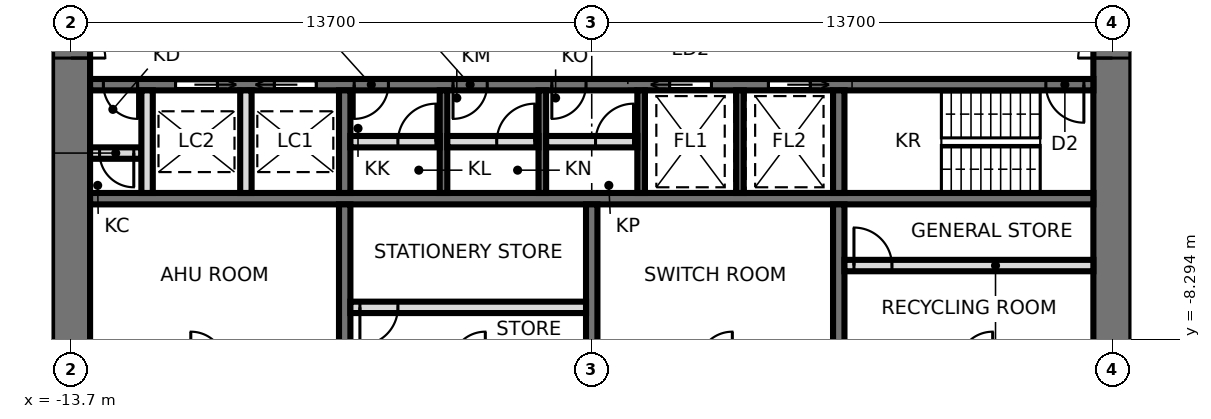
"""IFC4 building model, lengths in metres.
Left out: names, types, materials, properties, quantities, classifications, styles, units other than length and angle.
Written with IfcOpenShell. Run it as: python <this file> out.ifc"""

import sys

from ifc_helpers import new_model, si_unit, direction, frame, frame_2d, origin, place, context, subcontext, project, spatial, rectangle, extrude, element, fill, save


model = new_model("IFC4")
c1 = context("Model", 3, precision=1e-05, world=origin(), true_north=direction((0.0, 1.0)))
c2 = subcontext(c1, "Body", "Model", "MODEL_VIEW")
j1 = project(units=[si_unit("LENGTHUNIT", "METRE"), si_unit("PLANEANGLEUNIT", "RADIAN")], contexts=[c1])
p1 = place(None, origin())
s1 = spatial("IfcSite", under=j1, at=p1, CompositionType="ELEMENT")
p2 = place(p1, origin())
s2 = spatial("IfcBuilding", under=s1, at=p2, CompositionType="ELEMENT")
p3 = place(p2, frame((0.0, 0.0, 242.3)))
s3 = spatial("IfcBuildingStorey", under=s2, at=p3, CompositionType="ELEMENT", Elevation=242.3)
p4 = place(p3, frame((13.7, -9.5, 0.0), z_axis=(0.0, 0.0, 1.0), x_axis=(0.0, 1.0, 0.0)))
e1 = element("IfcWall", 1, at=p4, inside=s3, PredefinedType="SHEAR", context=c2, shape_type="SweptSolid", body=[
    extrude(rectangle(XDim=19.0, YDim=1.0, at=frame_2d((9.5, 0.0))), origin(), (0.0, 0.0, 1.0), 3.9),
])
p5 = place(p4, frame((8.6, 0.0, 0.0)))
e2 = element("IfcOpeningElement", 2, at=p5, cuts=e1, PredefinedType="OPENING", context=c2, shape_type="SweptSolid", body=[
    extrude(rectangle(XDim=1.8, YDim=2.4, at=frame_2d((0.9, 1.2))), frame((0.0, 0.51, 0.0), z_axis=(0.0, -1.0, 0.0), x_axis=(1.0, 0.0, 0.0)), (0.0, 0.0, 1.0), 1.02),
])
p6 = place(p3, frame((-13.7, 9.5, 0.0), z_axis=(0.0, 0.0, 1.0), x_axis=(0.0, -1.0, 0.0)))
e3 = element("IfcWall", 3, at=p6, inside=s3, PredefinedType="SHEAR", context=c2, shape_type="SweptSolid", body=[
    extrude(rectangle(XDim=19.0, YDim=1.0, at=frame_2d((9.5, 0.0))), origin(), (0.0, 0.0, 1.0), 3.9),
])
p7 = place(p6, frame((8.6, 0.0, 0.0)))
e4 = element("IfcOpeningElement", 4, at=p7, cuts=e3, PredefinedType="OPENING", context=c2, shape_type="SweptSolid", body=[
    extrude(rectangle(XDim=1.8, YDim=2.4, at=frame_2d((0.9, 1.2))), frame((0.0, 0.51, 0.0), z_axis=(0.0, -1.0, 0.0), x_axis=(1.0, 0.0, 0.0)), (0.0, 0.0, 1.0), 1.02),
])
p8 = place(p3, frame((-13.2, -1.6, 0.0), z_axis=(0.0, 0.0, 1.0), x_axis=(1.0, 0.0, 0.0)))
e5 = element("IfcWall", 5, at=p8, inside=s3, PredefinedType="SHEAR", context=c2, shape_type="SweptSolid", body=[
    extrude(rectangle(XDim=26.4, YDim=0.3, at=frame_2d((13.2, 0.0))), origin(), (0.0, 0.0, 1.0), 3.9),
])
p9 = place(p8, frame((25.15, 0.0, 0.0)))
e6 = element("IfcOpeningElement", 6, at=p9, cuts=e5, PredefinedType="OPENING", context=c2, shape_type="SweptSolid", body=[
    extrude(rectangle(XDim=1.0, YDim=2.1, at=frame_2d((0.5, 1.05))), frame((0.0, 0.16, 0.0), z_axis=(0.0, -1.0, 0.0), x_axis=(1.0, 0.0, 0.0)), (0.0, 0.0, 1.0), 0.32),
])
p10 = place(p8, frame((6.95, 0.0, 0.0)))
e7 = element("IfcOpeningElement", 7, at=p10, cuts=e5, PredefinedType="OPENING", context=c2, shape_type="SweptSolid", body=[
    extrude(rectangle(XDim=0.9, YDim=2.1, at=frame_2d((0.45, 1.05))), frame((0.0, 0.16, 0.0), z_axis=(0.0, -1.0, 0.0), x_axis=(1.0, 0.0, 0.0)), (0.0, 0.0, 1.0), 0.32),
])
p11 = place(p8, frame((9.55, 0.0, 0.0)))
e8 = element("IfcOpeningElement", 8, at=p11, cuts=e5, PredefinedType="OPENING", context=c2, shape_type="SweptSolid", body=[
    extrude(rectangle(XDim=0.9, YDim=2.1, at=frame_2d((0.45, 1.05))), frame((0.0, 0.16, 0.0), z_axis=(0.0, -1.0, 0.0), x_axis=(1.0, 0.0, 0.0)), (0.0, 0.0, 1.0), 0.32),
])
p12 = place(p8, frame((12.15, 0.0, 0.0)))
e9 = element("IfcOpeningElement", 9, at=p12, cuts=e5, PredefinedType="OPENING", context=c2, shape_type="SweptSolid", body=[
    extrude(rectangle(XDim=0.9, YDim=2.1, at=frame_2d((0.45, 1.05))), frame((0.0, 0.16, 0.0), z_axis=(0.0, -1.0, 0.0), x_axis=(1.0, 0.0, 0.0)), (0.0, 0.0, 1.0), 0.32),
])
p13 = place(p8, frame((15.25, 0.0, 0.0)))
e10 = element("IfcOpeningElement", 10, at=p13, cuts=e5, PredefinedType="OPENING", context=c2, shape_type="SweptSolid", body=[
    extrude(rectangle(XDim=1.1, YDim=2.3, at=frame_2d((0.55, 1.15))), frame((0.0, 0.16, 0.0), z_axis=(0.0, -1.0, 0.0), x_axis=(1.0, 0.0, 0.0)), (0.0, 0.0, 1.0), 0.32),
])
p14 = place(p8, frame((17.85, 0.0, 0.0)))
e11 = element("IfcOpeningElement", 11, at=p14, cuts=e5, PredefinedType="OPENING", context=c2, shape_type="SweptSolid", body=[
    extrude(rectangle(XDim=1.1, YDim=2.3, at=frame_2d((0.55, 1.15))), frame((0.0, 0.16, 0.0), z_axis=(0.0, -1.0, 0.0), x_axis=(1.0, 0.0, 0.0)), (0.0, 0.0, 1.0), 0.32),
])
p15 = place(p8, frame((4.85, 0.0, 0.0)))
e12 = element("IfcOpeningElement", 12, at=p15, cuts=e5, PredefinedType="OPENING", context=c2, shape_type="SweptSolid", body=[
    extrude(rectangle(XDim=1.1, YDim=2.3, at=frame_2d((0.55, 1.15))), frame((0.0, 0.16, 0.0), z_axis=(0.0, -1.0, 0.0), x_axis=(1.0, 0.0, 0.0)), (0.0, 0.0, 1.0), 0.32),
])
p16 = place(p8, frame((2.25, 0.0, 0.0)))
e13 = element("IfcOpeningElement", 13, at=p16, cuts=e5, PredefinedType="OPENING", context=c2, shape_type="SweptSolid", body=[
    extrude(rectangle(XDim=1.1, YDim=2.3, at=frame_2d((0.55, 1.15))), frame((0.0, 0.16, 0.0), z_axis=(0.0, -1.0, 0.0), x_axis=(1.0, 0.0, 0.0)), (0.0, 0.0, 1.0), 0.32),
])
p17 = place(p8, frame((0.35, 0.0, 0.0)))
e14 = element("IfcOpeningElement", 14, at=p17, cuts=e5, PredefinedType="OPENING", context=c2, shape_type="SweptSolid", body=[
    extrude(rectangle(XDim=0.9, YDim=2.1, at=frame_2d((0.45, 1.05))), frame((0.0, 0.16, 0.0), z_axis=(0.0, -1.0, 0.0), x_axis=(1.0, 0.0, 0.0)), (0.0, 0.0, 1.0), 0.32),
])
p18 = place(p3, frame((-13.2, -4.6, 0.0), z_axis=(0.0, 0.0, 1.0), x_axis=(1.0, 0.0, 0.0)))
e15 = element("IfcWall", 15, at=p18, inside=s3, PredefinedType="SHEAR", context=c2, shape_type="SweptSolid", body=[
    extrude(rectangle(XDim=26.4, YDim=0.3, at=frame_2d((13.2, 0.0))), origin(), (0.0, 0.0, 1.0), 3.9),
])
p19 = place(p3, frame((-6.5, -1.75, 0.0), z_axis=(0.0, 0.0, 1.0), x_axis=(0.0, -1.0, 0.0)))
e16 = element("IfcWall", 16, at=p19, inside=s3, PredefinedType="SHEAR", context=c2, shape_type="SweptSolid", body=[
    extrude(rectangle(XDim=2.7, YDim=0.3, at=frame_2d((1.35, 0.0))), origin(), (0.0, 0.0, 1.0), 3.9),
])
p20 = place(p3, frame((-6.5, -4.75, 0.0), z_axis=(0.0, 0.0, 1.0), x_axis=(0.0, -1.0, 0.0)))
e17 = element("IfcWall", 17, at=p20, inside=s3, PredefinedType="SHEAR", context=c2, shape_type="SweptSolid", body=[
    extrude(rectangle(XDim=3.75, YDim=0.3, at=frame_2d((1.875, 0.0))), origin(), (0.0, 0.0, 1.0), 3.9),
])
p21 = place(p3, frame((6.5, -1.75, 0.0), z_axis=(0.0, 0.0, 1.0), x_axis=(0.0, -1.0, 0.0)))
e18 = element("IfcWall", 18, at=p21, inside=s3, PredefinedType="SHEAR", context=c2, shape_type="SweptSolid", body=[
    extrude(rectangle(XDim=2.7, YDim=0.3, at=frame_2d((1.35, 0.0))), origin(), (0.0, 0.0, 1.0), 3.9),
])
p22 = place(p3, frame((6.5, -4.75, 0.0), z_axis=(0.0, 0.0, 1.0), x_axis=(0.0, -1.0, 0.0)))
e19 = element("IfcWall", 19, at=p22, inside=s3, PredefinedType="SHEAR", context=c2, shape_type="SweptSolid", body=[
    extrude(rectangle(XDim=3.75, YDim=0.3, at=frame_2d((1.875, 0.0))), origin(), (0.0, 0.0, 1.0), 3.9),
])
for number, where, z_axis, x_axis in (
    (20, (-3.9, -1.75, 0.0), (0.0, 0.0, 1.0), (0.0, -1.0, 0.0)),
    (21, (-1.3, -1.75, 0.0), (0.0, 0.0, 1.0), (0.0, -1.0, 0.0)),
    (22, (1.3, -1.75, 0.0), (0.0, 0.0, 1.0), (0.0, -1.0, 0.0)),
    (23, (3.9, -1.75, 0.0), (0.0, 0.0, 1.0), (0.0, -1.0, 0.0)),
):
    element("IfcWall", number, at=place(p3, frame(where, z_axis=z_axis, x_axis=x_axis)), inside=s3, PredefinedType="SHEAR", context=c2, shape_type="SweptSolid", body=[
        extrude(rectangle(XDim=2.7, YDim=0.2, at=frame_2d((1.35, 0.0))), origin(), (0.0, 0.0, 1.0), 3.9),
    ])
p23 = place(p3, frame((0.0, -4.75, 0.0), z_axis=(0.0, 0.0, 1.0), x_axis=(0.0, -1.0, 0.0)))
e24 = element("IfcWall", 24, at=p23, inside=s3, PredefinedType="SHEAR", context=c2, shape_type="SweptSolid", body=[
    extrude(rectangle(XDim=3.75, YDim=0.3, at=frame_2d((1.875, 0.0))), origin(), (0.0, 0.0, 1.0), 3.9),
])
p24 = place(p3, frame((-6.35, -3.1, 0.0), z_axis=(0.0, 0.0, 1.0), x_axis=(1.0, 0.0, 0.0)))
e25 = element("IfcWall", 25, at=p24, inside=s3, PredefinedType="PARTITIONING", context=c2, shape_type="SweptSolid", body=[
    extrude(rectangle(XDim=2.35, YDim=0.3, at=frame_2d((1.175, 0.0))), origin(), (0.0, 0.0, 1.0), 3.7),
])
p25 = place(p24, frame((1.25, 0.0, 0.0)))
e26 = element("IfcOpeningElement", 26, at=p25, cuts=e25, PredefinedType="OPENING", context=c2, shape_type="SweptSolid", body=[
    extrude(rectangle(XDim=1.0, YDim=2.4, at=frame_2d((0.5, 1.2))), frame((0.0, 0.16, 0.0), z_axis=(0.0, -1.0, 0.0), x_axis=(1.0, 0.0, 0.0)), (0.0, 0.0, 1.0), 0.32),
])
p26 = place(p3, frame((-3.8, -3.1, 0.0), z_axis=(0.0, 0.0, 1.0), x_axis=(1.0, 0.0, 0.0)))
e27 = element("IfcWall", 27, at=p26, inside=s3, PredefinedType="PARTITIONING", context=c2, shape_type="SweptSolid", body=[
    extrude(rectangle(XDim=2.4, YDim=0.3, at=frame_2d((1.2, 0.0))), origin(), (0.0, 0.0, 1.0), 3.7),
])
p27 = place(p26, frame((1.3, 0.0, 0.0)))
e28 = element("IfcOpeningElement", 28, at=p27, cuts=e27, PredefinedType="OPENING", context=c2, shape_type="SweptSolid", body=[
    extrude(rectangle(XDim=1.0, YDim=2.4, at=frame_2d((0.5, 1.2))), frame((0.0, 0.16, 0.0), z_axis=(0.0, -1.0, 0.0), x_axis=(1.0, 0.0, 0.0)), (0.0, 0.0, 1.0), 0.32),
])
p28 = place(p3, frame((-1.2, -3.1, 0.0), z_axis=(0.0, 0.0, 1.0), x_axis=(1.0, 0.0, 0.0)))
e29 = element("IfcWall", 29, at=p28, inside=s3, PredefinedType="PARTITIONING", context=c2, shape_type="SweptSolid", body=[
    extrude(rectangle(XDim=2.4, YDim=0.3, at=frame_2d((1.2, 0.0))), origin(), (0.0, 0.0, 1.0), 3.7),
])
p29 = place(p28, frame((1.3, 0.0, 0.0)))
e30 = element("IfcOpeningElement", 30, at=p29, cuts=e29, PredefinedType="OPENING", context=c2, shape_type="SweptSolid", body=[
    extrude(rectangle(XDim=1.0, YDim=2.4, at=frame_2d((0.5, 1.2))), frame((0.0, 0.16, 0.0), z_axis=(0.0, -1.0, 0.0), x_axis=(1.0, 0.0, 0.0)), (0.0, 0.0, 1.0), 0.32),
])
p30 = place(p3, frame((-6.35, -7.46, 0.0), z_axis=(0.0, 0.0, 1.0), x_axis=(1.0, 0.0, 0.0)))
e31 = element("IfcWall", 31, at=p30, inside=s3, PredefinedType="PARTITIONING", context=c2, shape_type="SweptSolid", body=[
    extrude(rectangle(XDim=6.2, YDim=0.3, at=frame_2d((3.1, 0.0))), origin(), (0.0, 0.0, 1.0), 3.7),
])
p31 = place(p30, frame((0.25, 0.0, 0.0)))
e32 = element("IfcOpeningElement", 32, at=p31, cuts=e31, PredefinedType="OPENING", context=c2, shape_type="SweptSolid", body=[
    extrude(rectangle(XDim=1.0, YDim=2.4, at=frame_2d((0.5, 1.2))), frame((0.0, 0.16, 0.0), z_axis=(0.0, -1.0, 0.0), x_axis=(1.0, 0.0, 0.0)), (0.0, 0.0, 1.0), 0.32),
])
p32 = place(p3, frame((6.65, -6.36, 0.0), z_axis=(0.0, 0.0, 1.0), x_axis=(1.0, 0.0, 0.0)))
e33 = element("IfcWall", 33, at=p32, inside=s3, PredefinedType="PARTITIONING", context=c2, shape_type="SweptSolid", body=[
    extrude(rectangle(XDim=6.55, YDim=0.3, at=frame_2d((3.275, 0.0))), origin(), (0.0, 0.0, 1.0), 3.7),
])
p33 = place(p32, frame((0.25, 0.0, 0.0)))
e34 = element("IfcOpeningElement", 34, at=p33, cuts=e33, PredefinedType="OPENING", context=c2, shape_type="SweptSolid", body=[
    extrude(rectangle(XDim=1.0, YDim=2.4, at=frame_2d((0.5, 1.2))), frame((0.0, 0.16, 0.0), z_axis=(0.0, -1.0, 0.0), x_axis=(1.0, 0.0, 0.0)), (0.0, 0.0, 1.0), 0.32),
])
p34 = place(p3, frame((-13.2, -3.4, 0.0), z_axis=(0.0, 0.0, 1.0), x_axis=(1.0, 0.0, 0.0)))
e35 = element("IfcWall", 35, at=p34, inside=s3, PredefinedType="SOLIDWALL", context=c2, shape_type="SweptSolid", body=[
    extrude(rectangle(XDim=1.35, YDim=0.3, at=frame_2d((0.675, 0.0))), origin(), (0.0, 0.0, 1.0), 3.7),
])
p35 = place(p34, frame((0.25, 0.0, 0.0)))
e36 = element("IfcOpeningElement", 36, at=p35, cuts=e35, PredefinedType="OPENING", context=c2, shape_type="SweptSolid", body=[
    extrude(rectangle(XDim=0.9, YDim=2.1, at=frame_2d((0.45, 1.05))), frame((0.0, 0.16, 0.0), z_axis=(0.0, -1.0, 0.0), x_axis=(1.0, 0.0, 0.0)), (0.0, 0.0, 1.0), 0.32),
])
for number, where, z_axis, x_axis in (
    (37, (-9.1, -1.75, 0.0), (0.0, 0.0, 1.0), (0.0, -1.0, 0.0)),
    (38, (-11.7, -1.75, 0.0), (0.0, 0.0, 1.0), (0.0, -1.0, 0.0)),
):
    element("IfcWall", number, at=place(p3, frame(where, z_axis=z_axis, x_axis=x_axis)), inside=s3, PredefinedType="SOLIDWALL", context=c2, shape_type="SweptSolid", body=[
        extrude(rectangle(XDim=2.7, YDim=0.3, at=frame_2d((1.35, 0.0))), origin(), (0.0, 0.0, 1.0), 3.7),
    ])
p36 = place(p7, origin())
e39 = element("IfcDoor", 39, at=p36, inside=s3, OperationType="DOUBLE_DOOR_SINGLE_SWING", PredefinedType="DOOR", context=c2, shape_type="SweptSolid", body=[
    extrude(rectangle(XDim=1.72, YDim=2.36, at=frame_2d((0.9, 1.18))), frame((0.0, 0.025, 0.0), z_axis=(0.0, -1.0, 0.0), x_axis=(1.0, 0.0, 0.0)), (0.0, 0.0, 1.0), 0.05),
    extrude(rectangle(XDim=0.04, YDim=2.4, at=frame_2d((0.02, 1.2))), frame((0.0, 0.25, 0.0), z_axis=(0.0, -1.0, 0.0), x_axis=(1.0, 0.0, 0.0)), (0.0, 0.0, 1.0), 0.5),
    extrude(rectangle(XDim=0.04, YDim=2.4, at=frame_2d((1.78, 1.2))), frame((0.0, 0.25, 0.0), z_axis=(0.0, -1.0, 0.0), x_axis=(1.0, 0.0, 0.0)), (0.0, 0.0, 1.0), 0.5),
    extrude(rectangle(XDim=1.72, YDim=0.04, at=frame_2d((0.9, 2.38))), frame((0.0, 0.25, 0.0), z_axis=(0.0, -1.0, 0.0), x_axis=(1.0, 0.0, 0.0)), (0.0, 0.0, 1.0), 0.5),
])
fill(e4, e39)
p37 = place(p5, origin())
e40 = element("IfcDoor", 40, at=p37, inside=s3, OperationType="DOUBLE_DOOR_SINGLE_SWING", PredefinedType="DOOR", context=c2, shape_type="SweptSolid", body=[
    extrude(rectangle(XDim=1.72, YDim=2.36, at=frame_2d((0.9, 1.18))), frame((0.0, 0.025, 0.0), z_axis=(0.0, -1.0, 0.0), x_axis=(1.0, 0.0, 0.0)), (0.0, 0.0, 1.0), 0.05),
    extrude(rectangle(XDim=0.04, YDim=2.4, at=frame_2d((0.02, 1.2))), frame((0.0, 0.25, 0.0), z_axis=(0.0, -1.0, 0.0), x_axis=(1.0, 0.0, 0.0)), (0.0, 0.0, 1.0), 0.5),
    extrude(rectangle(XDim=0.04, YDim=2.4, at=frame_2d((1.78, 1.2))), frame((0.0, 0.25, 0.0), z_axis=(0.0, -1.0, 0.0), x_axis=(1.0, 0.0, 0.0)), (0.0, 0.0, 1.0), 0.5),
    extrude(rectangle(XDim=1.72, YDim=0.04, at=frame_2d((0.9, 2.38))), frame((0.0, 0.25, 0.0), z_axis=(0.0, -1.0, 0.0), x_axis=(1.0, 0.0, 0.0)), (0.0, 0.0, 1.0), 0.5),
])
fill(e2, e40)
p38 = place(p9, frame((1.0, 0.0, 0.0), z_axis=(0.0, 0.0, 1.0), x_axis=(-1.0, 0.0, 0.0)))
e41 = element("IfcDoor", 41, at=p38, inside=s3, OperationType="SINGLE_SWING_LEFT", PredefinedType="DOOR", context=c2, shape_type="SweptSolid", body=[
    extrude(rectangle(XDim=1.0, YDim=2.1, at=frame_2d((0.5, 1.05))), frame((0.0, 0.025, 0.0), z_axis=(0.0, -1.0, 0.0), x_axis=(1.0, 0.0, 0.0)), (0.0, 0.0, 1.0), 0.05),
])
fill(e6, e41)
p39 = place(p25, origin())
e42 = element("IfcDoor", 42, at=p39, inside=s3, OperationType="SINGLE_SWING_RIGHT", PredefinedType="DOOR", context=c2, shape_type="SweptSolid", body=[
    extrude(rectangle(XDim=1.0, YDim=2.4, at=frame_2d((0.5, 1.2))), frame((0.0, 0.025, 0.0), z_axis=(0.0, -1.0, 0.0), x_axis=(1.0, 0.0, 0.0)), (0.0, 0.0, 1.0), 0.05),
])
fill(e26, e42)
p40 = place(p10, frame((0.9, 0.0, 0.0), z_axis=(0.0, 0.0, 1.0), x_axis=(-1.0, 0.0, 0.0)))
e43 = element("IfcDoor", 43, at=p40, inside=s3, OperationType="SINGLE_SWING_RIGHT", PredefinedType="DOOR", context=c2, shape_type="SweptSolid", body=[
    extrude(rectangle(XDim=0.9, YDim=2.1, at=frame_2d((0.45, 1.05))), frame((0.0, 0.025, 0.0), z_axis=(0.0, -1.0, 0.0), x_axis=(1.0, 0.0, 0.0)), (0.0, 0.0, 1.0), 0.05),
])
fill(e7, e43)
p41 = place(p27, origin())
e44 = element("IfcDoor", 44, at=p41, inside=s3, OperationType="SINGLE_SWING_RIGHT", PredefinedType="DOOR", context=c2, shape_type="SweptSolid", body=[
    extrude(rectangle(XDim=1.0, YDim=2.4, at=frame_2d((0.5, 1.2))), frame((0.0, 0.025, 0.0), z_axis=(0.0, -1.0, 0.0), x_axis=(1.0, 0.0, 0.0)), (0.0, 0.0, 1.0), 0.05),
])
fill(e28, e44)
p42 = place(p11, frame((0.9, 0.0, 0.0), z_axis=(0.0, 0.0, 1.0), x_axis=(-1.0, 0.0, 0.0)))
e45 = element("IfcDoor", 45, at=p42, inside=s3, OperationType="SINGLE_SWING_RIGHT", PredefinedType="DOOR", context=c2, shape_type="SweptSolid", body=[
    extrude(rectangle(XDim=0.9, YDim=2.1, at=frame_2d((0.45, 1.05))), frame((0.0, 0.025, 0.0), z_axis=(0.0, -1.0, 0.0), x_axis=(1.0, 0.0, 0.0)), (0.0, 0.0, 1.0), 0.05),
])
fill(e8, e45)
p43 = place(p29, origin())
e46 = element("IfcDoor", 46, at=p43, inside=s3, OperationType="SINGLE_SWING_RIGHT", PredefinedType="DOOR", context=c2, shape_type="SweptSolid", body=[
    extrude(rectangle(XDim=1.0, YDim=2.4, at=frame_2d((0.5, 1.2))), frame((0.0, 0.025, 0.0), z_axis=(0.0, -1.0, 0.0), x_axis=(1.0, 0.0, 0.0)), (0.0, 0.0, 1.0), 0.05),
])
fill(e30, e46)
p44 = place(p12, frame((0.9, 0.0, 0.0), z_axis=(0.0, 0.0, 1.0), x_axis=(-1.0, 0.0, 0.0)))
e47 = element("IfcDoor", 47, at=p44, inside=s3, OperationType="SINGLE_SWING_RIGHT", PredefinedType="DOOR", context=c2, shape_type="SweptSolid", body=[
    extrude(rectangle(XDim=0.9, YDim=2.1, at=frame_2d((0.45, 1.05))), frame((0.0, 0.025, 0.0), z_axis=(0.0, -1.0, 0.0), x_axis=(1.0, 0.0, 0.0)), (0.0, 0.0, 1.0), 0.05),
])
fill(e9, e47)
p45 = place(p13, frame((1.1, 0.0, 0.0), z_axis=(0.0, 0.0, 1.0), x_axis=(-1.0, 0.0, 0.0)))
e48 = element("IfcDoor", 48, at=p45, inside=s3, OperationType="SLIDING_TO_RIGHT", PredefinedType="DOOR", context=c2, shape_type="SweptSolid", body=[
    extrude(rectangle(XDim=1.1, YDim=2.3, at=frame_2d((0.55, 1.15))), frame((0.0, 0.025, 0.0), z_axis=(0.0, -1.0, 0.0), x_axis=(1.0, 0.0, 0.0)), (0.0, 0.0, 1.0), 0.05),
])
fill(e10, e48)
p46 = place(p14, frame((1.1, 0.0, 0.0), z_axis=(0.0, 0.0, 1.0), x_axis=(-1.0, 0.0, 0.0)))
e49 = element("IfcDoor", 49, at=p46, inside=s3, OperationType="SLIDING_TO_LEFT", PredefinedType="DOOR", context=c2, shape_type="SweptSolid", body=[
    extrude(rectangle(XDim=1.1, YDim=2.3, at=frame_2d((0.55, 1.15))), frame((0.0, 0.025, 0.0), z_axis=(0.0, -1.0, 0.0), x_axis=(1.0, 0.0, 0.0)), (0.0, 0.0, 1.0), 0.05),
])
fill(e11, e49)
p47 = place(p15, frame((1.1, 0.0, 0.0), z_axis=(0.0, 0.0, 1.0), x_axis=(-1.0, 0.0, 0.0)))
e50 = element("IfcDoor", 50, at=p47, inside=s3, OperationType="SLIDING_TO_RIGHT", PredefinedType="DOOR", context=c2, shape_type="SweptSolid", body=[
    extrude(rectangle(XDim=1.1, YDim=2.3, at=frame_2d((0.55, 1.15))), frame((0.0, 0.025, 0.0), z_axis=(0.0, -1.0, 0.0), x_axis=(1.0, 0.0, 0.0)), (0.0, 0.0, 1.0), 0.05),
])
fill(e12, e50)
p48 = place(p16, frame((1.1, 0.0, 0.0), z_axis=(0.0, 0.0, 1.0), x_axis=(-1.0, 0.0, 0.0)))
e51 = element("IfcDoor", 51, at=p48, inside=s3, OperationType="SLIDING_TO_LEFT", PredefinedType="DOOR", context=c2, shape_type="SweptSolid", body=[
    extrude(rectangle(XDim=1.1, YDim=2.3, at=frame_2d((0.55, 1.15))), frame((0.0, 0.025, 0.0), z_axis=(0.0, -1.0, 0.0), x_axis=(1.0, 0.0, 0.0)), (0.0, 0.0, 1.0), 0.05),
])
fill(e13, e51)
p49 = place(p17, frame((0.9, 0.0, 0.0), z_axis=(0.0, 0.0, 1.0), x_axis=(-1.0, 0.0, 0.0)))
e52 = element("IfcDoor", 52, at=p49, inside=s3, OperationType="SINGLE_SWING_LEFT", PredefinedType="DOOR", context=c2, shape_type="SweptSolid", body=[
    extrude(rectangle(XDim=0.9, YDim=2.1, at=frame_2d((0.45, 1.05))), frame((0.0, 0.025, 0.0), z_axis=(0.0, -1.0, 0.0), x_axis=(1.0, 0.0, 0.0)), (0.0, 0.0, 1.0), 0.05),
])
fill(e14, e52)
p50 = place(p31, frame((1.0, 0.0, 0.0), z_axis=(0.0, 0.0, 1.0), x_axis=(-1.0, 0.0, 0.0)))
e53 = element("IfcDoor", 53, at=p50, inside=s3, OperationType="SINGLE_SWING_RIGHT", PredefinedType="DOOR", context=c2, shape_type="SweptSolid", body=[
    extrude(rectangle(XDim=1.0, YDim=2.4, at=frame_2d((0.5, 1.2))), frame((0.0, 0.025, 0.0), z_axis=(0.0, -1.0, 0.0), x_axis=(1.0, 0.0, 0.0)), (0.0, 0.0, 1.0), 0.05),
])
fill(e32, e53)
p51 = place(p33, origin())
e54 = element("IfcDoor", 54, at=p51, inside=s3, OperationType="SINGLE_SWING_LEFT", PredefinedType="DOOR", context=c2, shape_type="SweptSolid", body=[
    extrude(rectangle(XDim=1.0, YDim=2.4, at=frame_2d((0.5, 1.2))), frame((0.0, 0.025, 0.0), z_axis=(0.0, -1.0, 0.0), x_axis=(1.0, 0.0, 0.0)), (0.0, 0.0, 1.0), 0.05),
])
fill(e34, e54)
p52 = place(p35, frame((0.9, 0.0, 0.0), z_axis=(0.0, 0.0, 1.0), x_axis=(-1.0, 0.0, 0.0)))
e55 = element("IfcDoor", 55, at=p52, inside=s3, OperationType="SINGLE_SWING_LEFT", PredefinedType="DOOR", context=c2, shape_type="SweptSolid", body=[
    extrude(rectangle(XDim=0.9, YDim=2.1, at=frame_2d((0.45, 1.05))), frame((0.0, 0.025, 0.0), z_axis=(0.0, -1.0, 0.0), x_axis=(1.0, 0.0, 0.0)), (0.0, 0.0, 1.0), 0.05),
])
fill(e36, e55)
save(model, sys.argv[1])
